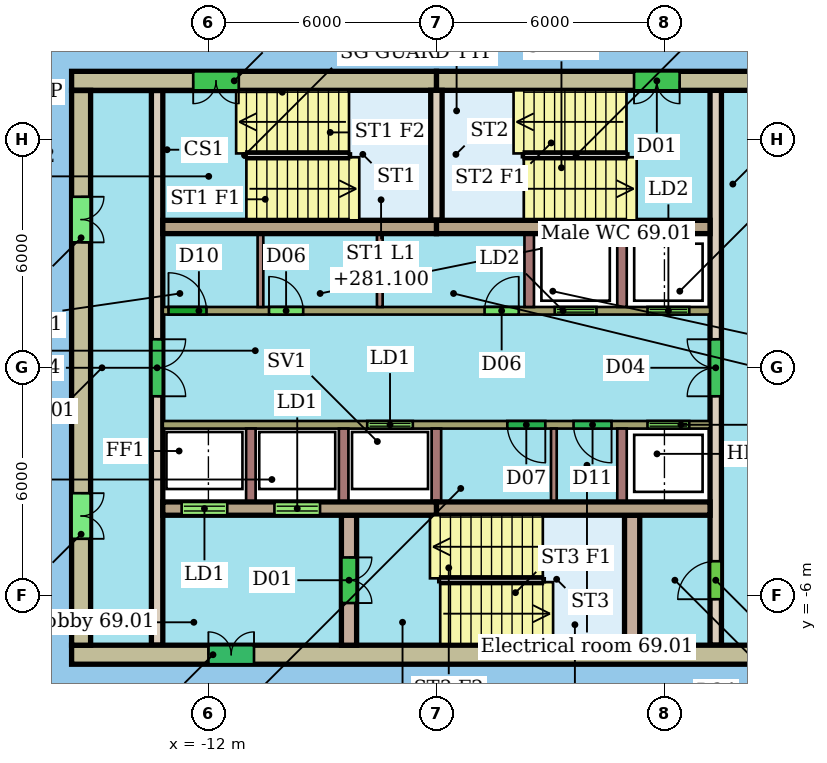
"""IFC4 building model, lengths in metres.
Left out: names, types, materials, properties, quantities, classifications, styles, units other than length and angle.
Written with IfcOpenShell. Run it as: python <this file> out.ifc"""

import sys

from ifc_helpers import new_model, si_unit, direction, frame, frame_2d, origin, place, context, subcontext, project, spatial, rectangle, extrude, element, fill, save


model = new_model("IFC4")
c1 = context("Model", 3, precision=1e-05, world=origin(), true_north=direction((0.0, 1.0)))
c2 = subcontext(c1, "Body", "Model", "MODEL_VIEW")
j1 = project(units=[si_unit("LENGTHUNIT", "METRE"), si_unit("PLANEANGLEUNIT", "RADIAN")], contexts=[c1])
p1 = place(None, origin())
s1 = spatial("IfcSite", under=j1, at=p1, CompositionType="ELEMENT")
p2 = place(p1, origin())
s2 = spatial("IfcBuilding", under=s1, at=p2, CompositionType="ELEMENT")
p3 = place(p2, frame((0.0, 0.0, 279.3)))
s3 = spatial("IfcBuildingStorey", under=s2, at=p3, CompositionType="ELEMENT", Elevation=279.3)
p4 = place(p3, frame((3.6, 7.55, 0.0), z_axis=(0.0, 0.0, 1.0), x_axis=(-1.0, 0.0, 0.0)))
e1 = element("IfcWall", 1, at=p4, inside=s3, PredefinedType="SHEAR", context=c2, shape_type="SweptSolid", body=[
    extrude(rectangle(XDim=9.6, YDim=0.5, at=frame_2d((4.8, 0.0))), origin(), (0.0, 0.0, 1.0), 3.3),
])
p5 = place(p4, frame((3.2, 0.0, 0.0)))
e2 = element("IfcOpeningElement", 2, at=p5, cuts=e1, PredefinedType="OPENING", context=c2, shape_type="SweptSolid", body=[
    extrude(rectangle(XDim=1.2, YDim=2.1, at=frame_2d((0.6, 1.05))), frame((0.0, 0.26, 0.0), z_axis=(0.0, -1.0, 0.0), x_axis=(1.0, 0.0, 0.0)), (0.0, 0.0, 1.0), 0.52),
])
p6 = place(p3, frame((-6.0, 7.55, 0.0), z_axis=(0.0, 0.0, 1.0), x_axis=(-1.0, 0.0, 0.0)))
e3 = element("IfcWall", 3, at=p6, inside=s3, PredefinedType="SHEAR", context=c2, shape_type="SweptSolid", body=[
    extrude(rectangle(XDim=9.6, YDim=0.5, at=frame_2d((4.8, 0.0))), origin(), (0.0, 0.0, 1.0), 3.3),
])
p7 = place(p6, frame((5.2, 0.0, 0.0)))
e4 = element("IfcOpeningElement", 4, at=p7, cuts=e3, PredefinedType="OPENING", context=c2, shape_type="SweptSolid", body=[
    extrude(rectangle(XDim=1.2, YDim=2.1, at=frame_2d((0.6, 1.05))), frame((0.0, 0.26, 0.0), z_axis=(0.0, -1.0, 0.0), x_axis=(1.0, 0.0, 0.0)), (0.0, 0.0, 1.0), 0.52),
])
p8 = place(p3, frame((-15.6, -7.55, 0.0), z_axis=(0.0, 0.0, 1.0), x_axis=(1.0, 0.0, 0.0)))
e5 = element("IfcWall", 5, at=p8, inside=s3, PredefinedType="SHEAR", context=c2, shape_type="SweptSolid", body=[
    extrude(rectangle(XDim=19.2, YDim=0.5, at=frame_2d((9.6, 0.0))), origin(), (0.0, 0.0, 1.0), 3.3),
])
p9 = place(p8, frame((3.6, 0.0, 0.0)))
e6 = element("IfcOpeningElement", 6, at=p9, cuts=e5, PredefinedType="OPENING", context=c2, shape_type="SweptSolid", body=[
    extrude(rectangle(XDim=1.2, YDim=2.1, at=frame_2d((0.6, 1.05))), frame((0.0, 0.26, 0.0), z_axis=(0.0, -1.0, 0.0), x_axis=(1.0, 0.0, 0.0)), (0.0, 0.0, 1.0), 0.52),
])
p10 = place(p3, frame((-15.35, 7.3, 0.0), z_axis=(0.0, 0.0, 1.0), x_axis=(0.0, -1.0, 0.0)))
e7 = element("IfcWall", 7, at=p10, inside=s3, PredefinedType="SHEAR", context=c2, shape_type="SweptSolid", body=[
    extrude(rectangle(XDim=14.6, YDim=0.5, at=frame_2d((7.3, 0.0))), origin(), (0.0, 0.0, 1.0), 3.3),
])
p11 = place(p10, frame((10.6, 0.0, 0.0)))
e8 = element("IfcOpeningElement", 8, at=p11, cuts=e7, PredefinedType="OPENING", context=c2, shape_type="SweptSolid", body=[
    extrude(rectangle(XDim=1.2, YDim=2.1, at=frame_2d((0.6, 1.05))), frame((0.0, 0.26, 0.0), z_axis=(0.0, -1.0, 0.0), x_axis=(1.0, 0.0, 0.0)), (0.0, 0.0, 1.0), 0.52),
])
p12 = place(p10, frame((2.8, 0.0, 0.0)))
e9 = element("IfcOpeningElement", 9, at=p12, cuts=e7, PredefinedType="OPENING", context=c2, shape_type="SweptSolid", body=[
    extrude(rectangle(XDim=1.2, YDim=2.1, at=frame_2d((0.6, 1.05))), frame((0.0, 0.26, 0.0), z_axis=(0.0, -1.0, 0.0), x_axis=(1.0, 0.0, 0.0)), (0.0, 0.0, 1.0), 0.52),
])
for number, where, z_axis, x_axis in (
    (10, (-13.2, 3.705, 0.0), (0.0, 0.0, 1.0), (1.0, 0.0, 0.0)),
    (11, (-6.0, 3.705, 0.0), (0.0, 0.0, 1.0), (1.0, 0.0, 0.0)),
):
    element("IfcWall", number, at=place(p3, frame(where, z_axis=z_axis, x_axis=x_axis)), inside=s3, PredefinedType="SHEAR", context=c2, shape_type="SweptSolid", body=[
        extrude(rectangle(XDim=7.2, YDim=0.35, at=frame_2d((3.6, 0.0))), origin(), (0.0, 0.0, 1.0), 3.3),
    ])
p13 = place(p3, frame((-13.2, -3.705, 0.0), z_axis=(0.0, 0.0, 1.0), x_axis=(1.0, 0.0, 0.0)))
e12 = element("IfcWall", 12, at=p13, inside=s3, PredefinedType="SHEAR", context=c2, shape_type="SweptSolid", body=[
    extrude(rectangle(XDim=7.2, YDim=0.35, at=frame_2d((3.6, 0.0))), origin(), (0.0, 0.0, 1.0), 3.3),
])
p14 = place(p13, frame((0.496, 0.0, 0.0)))
e13 = element("IfcOpeningElement", 13, at=p14, cuts=e12, PredefinedType="OPENING", context=c2, shape_type="SweptSolid", body=[
    extrude(rectangle(XDim=1.2, YDim=2.1, at=frame_2d((0.6, 1.05))), frame((0.0, 0.185, 0.0), z_axis=(0.0, -1.0, 0.0), x_axis=(1.0, 0.0, 0.0)), (0.0, 0.0, 1.0), 0.37),
])
p15 = place(p13, frame((2.938, 0.0, 0.0)))
e14 = element("IfcOpeningElement", 14, at=p15, cuts=e12, PredefinedType="OPENING", context=c2, shape_type="SweptSolid", body=[
    extrude(rectangle(XDim=1.2, YDim=2.1, at=frame_2d((0.6, 1.05))), frame((0.0, 0.185, 0.0), z_axis=(0.0, -1.0, 0.0), x_axis=(1.0, 0.0, 0.0)), (0.0, 0.0, 1.0), 0.37),
])
p16 = place(p3, frame((-6.0, -3.705, 0.0), z_axis=(0.0, 0.0, 1.0), x_axis=(1.0, 0.0, 0.0)))
e15 = element("IfcWall", 15, at=p16, inside=s3, PredefinedType="SHEAR", context=c2, shape_type="SweptSolid", body=[
    extrude(rectangle(XDim=7.2, YDim=0.35, at=frame_2d((3.6, 0.0))), origin(), (0.0, 0.0, 1.0), 3.3),
])
p17 = place(p3, frame((-13.35, 7.3, 0.0), z_axis=(0.0, 0.0, 1.0), x_axis=(0.0, -1.0, 0.0)))
e16 = element("IfcWall", 16, at=p17, inside=s3, PredefinedType="SHEAR", context=c2, shape_type="SweptSolid", body=[
    extrude(rectangle(XDim=14.6, YDim=0.3, at=frame_2d((7.3, 0.0))), origin(), (0.0, 0.0, 1.0), 3.3),
])
p18 = place(p17, frame((6.55, 0.0, 0.0)))
e17 = element("IfcOpeningElement", 17, at=p18, cuts=e16, PredefinedType="OPENING", context=c2, shape_type="SweptSolid", body=[
    extrude(rectangle(XDim=1.5, YDim=2.1, at=frame_2d((0.75, 1.05))), frame((0.0, 0.16, 0.0), z_axis=(0.0, -1.0, 0.0), x_axis=(1.0, 0.0, 0.0)), (0.0, 0.0, 1.0), 0.32),
])
p19 = place(p3, frame((1.35, -7.3, 0.0), z_axis=(0.0, 0.0, 1.0), x_axis=(0.0, 1.0, 0.0)))
e18 = element("IfcWall", 18, at=p19, inside=s3, PredefinedType="SHEAR", context=c2, shape_type="SweptSolid", body=[
    extrude(rectangle(XDim=14.6, YDim=0.3, at=frame_2d((7.3, 0.0))), origin(), (0.0, 0.0, 1.0), 3.3),
])
p20 = place(p19, frame((1.21, 0.0, 0.0)))
e19 = element("IfcOpeningElement", 19, at=p20, cuts=e18, PredefinedType="OPENING", context=c2, shape_type="SweptSolid", body=[
    extrude(rectangle(XDim=1.0, YDim=2.1, at=frame_2d((0.5, 1.05))), frame((0.0, 0.16, 0.0), z_axis=(0.0, -1.0, 0.0), x_axis=(1.0, 0.0, 0.0)), (0.0, 0.0, 1.0), 0.32),
])
p21 = place(p19, frame((6.55, 0.0, 0.0)))
e20 = element("IfcOpeningElement", 20, at=p21, cuts=e18, PredefinedType="OPENING", context=c2, shape_type="SweptSolid", body=[
    extrude(rectangle(XDim=1.5, YDim=2.1, at=frame_2d((0.75, 1.05))), frame((0.0, 0.16, 0.0), z_axis=(0.0, -1.0, 0.0), x_axis=(1.0, 0.0, 0.0)), (0.0, 0.0, 1.0), 0.32),
])
p22 = place(p3, frame((-13.2, 1.5, 0.0), z_axis=(0.0, 0.0, 1.0), x_axis=(1.0, 0.0, 0.0)))
e21 = element("IfcWall", 21, at=p22, inside=s3, PredefinedType="SHEAR", context=c2, shape_type="SweptSolid", body=[
    extrude(rectangle(XDim=14.4, YDim=0.2, at=frame_2d((7.2, 0.0))), origin(), (0.0, 0.0, 1.0), 3.3),
])
p23 = place(p22, frame((10.312, 0.0, 0.0)))
e22 = element("IfcOpeningElement", 22, at=p23, cuts=e21, PredefinedType="OPENING", context=c2, shape_type="SweptSolid", body=[
    extrude(rectangle(XDim=1.1, YDim=2.1, at=frame_2d((0.55, 1.05))), frame((0.0, 0.11, 0.0), z_axis=(0.0, -1.0, 0.0), x_axis=(1.0, 0.0, 0.0)), (0.0, 0.0, 1.0), 0.22),
])
p24 = place(p22, frame((12.754, 0.0, 0.0)))
e23 = element("IfcOpeningElement", 23, at=p24, cuts=e21, PredefinedType="OPENING", context=c2, shape_type="SweptSolid", body=[
    extrude(rectangle(XDim=1.1, YDim=2.1, at=frame_2d((0.55, 1.05))), frame((0.0, 0.11, 0.0), z_axis=(0.0, -1.0, 0.0), x_axis=(1.0, 0.0, 0.0)), (0.0, 0.0, 1.0), 0.22),
])
p25 = place(p22, frame((0.15, 0.0, 0.0)))
e24 = element("IfcOpeningElement", 24, at=p25, cuts=e21, PredefinedType="OPENING", context=c2, shape_type="SweptSolid", body=[
    extrude(rectangle(XDim=1.0, YDim=2.1, at=frame_2d((0.5, 1.05))), frame((0.0, 0.11, 0.0), z_axis=(0.0, -1.0, 0.0), x_axis=(1.0, 0.0, 0.0)), (0.0, 0.0, 1.0), 0.22),
])
p26 = place(p22, frame((2.794, 0.0, 0.0)))
e25 = element("IfcOpeningElement", 25, at=p26, cuts=e21, PredefinedType="OPENING", context=c2, shape_type="SweptSolid", body=[
    extrude(rectangle(XDim=0.9, YDim=2.1, at=frame_2d((0.45, 1.05))), frame((0.0, 0.11, 0.0), z_axis=(0.0, -1.0, 0.0), x_axis=(1.0, 0.0, 0.0)), (0.0, 0.0, 1.0), 0.22),
])
p27 = place(p22, frame((8.467, 0.0, 0.0)))
e26 = element("IfcOpeningElement", 26, at=p27, cuts=e21, PredefinedType="OPENING", context=c2, shape_type="SweptSolid", body=[
    extrude(rectangle(XDim=0.9, YDim=2.1, at=frame_2d((0.45, 1.05))), frame((0.0, 0.11, 0.0), z_axis=(0.0, -1.0, 0.0), x_axis=(1.0, 0.0, 0.0)), (0.0, 0.0, 1.0), 0.22),
])
p28 = place(p3, frame((1.2, -1.5, 0.0), z_axis=(0.0, 0.0, 1.0), x_axis=(-1.0, 0.0, 0.0)))
e27 = element("IfcWall", 27, at=p28, inside=s3, PredefinedType="SHEAR", context=c2, shape_type="SweptSolid", body=[
    extrude(rectangle(XDim=14.4, YDim=0.2, at=frame_2d((7.2, 0.0))), origin(), (0.0, 0.0, 1.0), 3.3),
])
p29 = place(p28, frame((7.821, 0.0, 0.0)))
e28 = element("IfcOpeningElement", 28, at=p29, cuts=e27, PredefinedType="OPENING", context=c2, shape_type="SweptSolid", body=[
    extrude(rectangle(XDim=1.2, YDim=2.1, at=frame_2d((0.6, 1.05))), frame((0.0, 0.11, 0.0), z_axis=(0.0, -1.0, 0.0), x_axis=(1.0, 0.0, 0.0)), (0.0, 0.0, 1.0), 0.22),
])
p30 = place(p28, frame((0.546, 0.0, 0.0)))
e29 = element("IfcOpeningElement", 29, at=p30, cuts=e27, PredefinedType="OPENING", context=c2, shape_type="SweptSolid", body=[
    extrude(rectangle(XDim=1.1, YDim=2.1, at=frame_2d((0.55, 1.05))), frame((0.0, 0.11, 0.0), z_axis=(0.0, -1.0, 0.0), x_axis=(1.0, 0.0, 0.0)), (0.0, 0.0, 1.0), 0.22),
])
p31 = place(p28, frame((4.335, 0.0, 0.0)))
e30 = element("IfcOpeningElement", 30, at=p31, cuts=e27, PredefinedType="OPENING", context=c2, shape_type="SweptSolid", body=[
    extrude(rectangle(XDim=1.0, YDim=2.1, at=frame_2d((0.5, 1.05))), frame((0.0, 0.11, 0.0), z_axis=(0.0, -1.0, 0.0), x_axis=(1.0, 0.0, 0.0)), (0.0, 0.0, 1.0), 0.22),
])
p32 = place(p28, frame((2.592, 0.0, 0.0)))
e31 = element("IfcOpeningElement", 31, at=p32, cuts=e27, PredefinedType="OPENING", context=c2, shape_type="SweptSolid", body=[
    extrude(rectangle(XDim=1.0, YDim=2.1, at=frame_2d((0.5, 1.05))), frame((0.0, 0.11, 0.0), z_axis=(0.0, -1.0, 0.0), x_axis=(1.0, 0.0, 0.0)), (0.0, 0.0, 1.0), 0.22),
])
p33 = place(p3, frame((-8.3, -3.88, 0.0), z_axis=(0.0, 0.0, 1.0), x_axis=(0.0, -1.0, 0.0)))
e32 = element("IfcWall", 32, at=p33, inside=s3, PredefinedType="SHEAR", context=c2, shape_type="SweptSolid", body=[
    extrude(rectangle(XDim=3.42, YDim=0.4, at=frame_2d((1.71, 0.0))), origin(), (0.0, 0.0, 1.0), 3.3),
])
p34 = place(p33, frame((1.11, 0.0, 0.0)))
e33 = element("IfcOpeningElement", 33, at=p34, cuts=e32, PredefinedType="OPENING", context=c2, shape_type="SweptSolid", body=[
    extrude(rectangle(XDim=1.2, YDim=2.1, at=frame_2d((0.6, 1.05))), frame((0.0, 0.21, 0.0), z_axis=(0.0, -1.0, 0.0), x_axis=(1.0, 0.0, 0.0)), (0.0, 0.0, 1.0), 0.42),
])
p35 = place(p3, frame((-0.85, -3.88, 0.0), z_axis=(0.0, 0.0, 1.0), x_axis=(0.0, -1.0, 0.0)))
e34 = element("IfcWall", 34, at=p35, inside=s3, PredefinedType="SHEAR", context=c2, shape_type="SweptSolid", body=[
    extrude(rectangle(XDim=3.42, YDim=0.4, at=frame_2d((1.71, 0.0))), origin(), (0.0, 0.0, 1.0), 3.3),
])
p36 = place(p3, frame((-6.0, 3.88, 0.0), z_axis=(0.0, 0.0, 1.0), x_axis=(0.0, 1.0, 0.0)))
e35 = element("IfcWall", 35, at=p36, inside=s3, PredefinedType="SHEAR", context=c2, shape_type="SweptSolid", body=[
    extrude(rectangle(XDim=3.42, YDim=0.3, at=frame_2d((1.71, 0.0))), origin(), (0.0, 0.0, 1.0), 3.3),
])
for number, where, z_axis, x_axis in (
    (36, (-3.558, 1.6, 0.0), (0.0, 0.0, 1.0), (0.0, 1.0, 0.0)),
    (37, (-1.117, 1.6, 0.0), (0.0, 0.0, 1.0), (0.0, 1.0, 0.0)),
):
    element("IfcWall", number, at=place(p3, frame(where, z_axis=z_axis, x_axis=x_axis)), inside=s3, PredefinedType="SHEAR", context=c2, shape_type="SweptSolid", body=[
        extrude(rectangle(XDim=1.93, YDim=0.25, at=frame_2d((0.965, 0.0))), origin(), (0.0, 0.0, 1.0), 3.3),
    ])
for number, where, z_axis, x_axis in (
    (38, (-10.631, 1.6, 0.0), (0.0, 0.0, 1.0), (0.0, 1.0, 0.0)),
    (39, (-7.49, 1.6, 0.0), (0.0, 0.0, 1.0), (0.0, 1.0, 0.0)),
):
    element("IfcWall", number, at=place(p3, frame(where, z_axis=z_axis, x_axis=x_axis)), inside=s3, PredefinedType="PARTITIONING", context=c2, shape_type="SweptSolid", body=[
        extrude(rectangle(XDim=1.93, YDim=0.15, at=frame_2d((0.965, 0.0))), origin(), (0.0, 0.0, 1.0), 3.3),
    ])
for number, where, z_axis, x_axis in (
    (40, (-10.883, -1.6, 0.0), (0.0, 0.0, 1.0), (0.0, -1.0, 0.0)),
    (41, (-8.442, -1.6, 0.0), (0.0, 0.0, 1.0), (0.0, -1.0, 0.0)),
    (42, (-6.0, -1.6, 0.0), (0.0, 0.0, 1.0), (0.0, -1.0, 0.0)),
    (43, (-1.117, -1.6, 0.0), (0.0, 0.0, 1.0), (0.0, -1.0, 0.0)),
):
    element("IfcWall", number, at=place(p3, frame(where, z_axis=z_axis, x_axis=x_axis)), inside=s3, PredefinedType="SHEAR", context=c2, shape_type="SweptSolid", body=[
        extrude(rectangle(XDim=1.93, YDim=0.25, at=frame_2d((0.965, 0.0))), origin(), (0.0, 0.0, 1.0), 3.3),
    ])
p37 = place(p3, frame((-2.91, -1.6, 0.0), z_axis=(0.0, 0.0, 1.0), x_axis=(0.0, -1.0, 0.0)))
e44 = element("IfcWall", 44, at=p37, inside=s3, PredefinedType="PARTITIONING", context=c2, shape_type="SweptSolid", body=[
    extrude(rectangle(XDim=1.93, YDim=0.15, at=frame_2d((0.965, 0.0))), origin(), (0.0, 0.0, 1.0), 3.3),
])
p38 = place(p5, origin())
e45 = element("IfcDoor", 45, at=p38, inside=s3, OperationType="DOUBLE_DOOR_SINGLE_SWING", PredefinedType="NOTDEFINED", context=c2, shape_type="SweptSolid", body=[
    extrude(rectangle(XDim=1.2, YDim=2.1, at=frame_2d((0.6, 1.05))), frame((0.0, 0.025, 0.0), z_axis=(0.0, -1.0, 0.0), x_axis=(1.0, 0.0, 0.0)), (0.0, 0.0, 1.0), 0.05),
])
fill(e2, e45)
p39 = place(p7, origin())
e46 = element("IfcDoor", 46, at=p39, inside=s3, OperationType="DOUBLE_DOOR_SINGLE_SWING", PredefinedType="NOTDEFINED", context=c2, shape_type="SweptSolid", body=[
    extrude(rectangle(XDim=1.2, YDim=2.1, at=frame_2d((0.6, 1.05))), frame((0.0, 0.025, 0.0), z_axis=(0.0, -1.0, 0.0), x_axis=(1.0, 0.0, 0.0)), (0.0, 0.0, 1.0), 0.05),
])
fill(e4, e46)
p40 = place(p9, origin())
e47 = element("IfcDoor", 47, at=p40, inside=s3, OperationType="DOUBLE_DOOR_SINGLE_SWING", PredefinedType="NOTDEFINED", context=c2, shape_type="SweptSolid", body=[
    extrude(rectangle(XDim=1.2, YDim=2.1, at=frame_2d((0.6, 1.05))), frame((0.0, 0.025, 0.0), z_axis=(0.0, -1.0, 0.0), x_axis=(1.0, 0.0, 0.0)), (0.0, 0.0, 1.0), 0.05),
])
fill(e6, e47)
p41 = place(p11, origin())
e48 = element("IfcDoor", 48, at=p41, inside=s3, OperationType="DOUBLE_DOOR_SINGLE_SWING", PredefinedType="NOTDEFINED", context=c2, shape_type="SweptSolid", body=[
    extrude(rectangle(XDim=1.2, YDim=2.1, at=frame_2d((0.6, 1.05))), frame((0.0, 0.025, 0.0), z_axis=(0.0, -1.0, 0.0), x_axis=(1.0, 0.0, 0.0)), (0.0, 0.0, 1.0), 0.05),
])
fill(e8, e48)
p42 = place(p12, origin())
e49 = element("IfcDoor", 49, at=p42, inside=s3, OperationType="DOUBLE_DOOR_SINGLE_SWING", PredefinedType="NOTDEFINED", context=c2, shape_type="SweptSolid", body=[
    extrude(rectangle(XDim=1.2, YDim=2.1, at=frame_2d((0.6, 1.05))), frame((0.0, 0.025, 0.0), z_axis=(0.0, -1.0, 0.0), x_axis=(1.0, 0.0, 0.0)), (0.0, 0.0, 1.0), 0.05),
])
fill(e9, e49)
p43 = place(p14, origin())
e50 = element("IfcDoor", 50, at=p43, inside=s3, OperationType="DOUBLE_DOOR_SLIDING", PredefinedType="NOTDEFINED", context=c2, shape_type="SweptSolid", body=[
    extrude(rectangle(XDim=1.2, YDim=2.1, at=frame_2d((0.6, 1.05))), frame((0.0, 0.025, 0.0), z_axis=(0.0, -1.0, 0.0), x_axis=(1.0, 0.0, 0.0)), (0.0, 0.0, 1.0), 0.05),
])
fill(e13, e50)
p44 = place(p15, origin())
e51 = element("IfcDoor", 51, at=p44, inside=s3, OperationType="DOUBLE_DOOR_SLIDING", PredefinedType="NOTDEFINED", context=c2, shape_type="SweptSolid", body=[
    extrude(rectangle(XDim=1.2, YDim=2.1, at=frame_2d((0.6, 1.05))), frame((0.0, 0.025, 0.0), z_axis=(0.0, -1.0, 0.0), x_axis=(1.0, 0.0, 0.0)), (0.0, 0.0, 1.0), 0.05),
])
fill(e14, e51)
p45 = place(p18, origin())
e52 = element("IfcDoor", 52, at=p45, inside=s3, OperationType="DOUBLE_DOOR_SINGLE_SWING", PredefinedType="NOTDEFINED", context=c2, shape_type="SweptSolid", body=[
    extrude(rectangle(XDim=1.5, YDim=2.1, at=frame_2d((0.75, 1.05))), frame((0.0, 0.025, 0.0), z_axis=(0.0, -1.0, 0.0), x_axis=(1.0, 0.0, 0.0)), (0.0, 0.0, 1.0), 0.05),
])
fill(e17, e52)
p46 = place(p20, origin())
e53 = element("IfcDoor", 53, at=p46, inside=s3, OperationType="SINGLE_SWING_LEFT", PredefinedType="NOTDEFINED", context=c2, shape_type="SweptSolid", body=[
    extrude(rectangle(XDim=1.0, YDim=2.1, at=frame_2d((0.5, 1.05))), frame((0.0, 0.025, 0.0), z_axis=(0.0, -1.0, 0.0), x_axis=(1.0, 0.0, 0.0)), (0.0, 0.0, 1.0), 0.05),
])
fill(e19, e53)
p47 = place(p21, origin())
e54 = element("IfcDoor", 54, at=p47, inside=s3, OperationType="DOUBLE_DOOR_SINGLE_SWING", PredefinedType="NOTDEFINED", context=c2, shape_type="SweptSolid", body=[
    extrude(rectangle(XDim=1.5, YDim=2.1, at=frame_2d((0.75, 1.05))), frame((0.0, 0.025, 0.0), z_axis=(0.0, -1.0, 0.0), x_axis=(1.0, 0.0, 0.0)), (0.0, 0.0, 1.0), 0.05),
])
fill(e20, e54)
p48 = place(p23, origin())
e55 = element("IfcDoor", 55, at=p48, inside=s3, OperationType="DOUBLE_DOOR_SLIDING", PredefinedType="NOTDEFINED", context=c2, shape_type="SweptSolid", body=[
    extrude(rectangle(XDim=1.1, YDim=2.1, at=frame_2d((0.55, 1.05))), frame((0.0, 0.025, 0.0), z_axis=(0.0, -1.0, 0.0), x_axis=(1.0, 0.0, 0.0)), (0.0, 0.0, 1.0), 0.05),
])
fill(e22, e55)
p49 = place(p24, origin())
e56 = element("IfcDoor", 56, at=p49, inside=s3, OperationType="DOUBLE_DOOR_SLIDING", PredefinedType="NOTDEFINED", context=c2, shape_type="SweptSolid", body=[
    extrude(rectangle(XDim=1.1, YDim=2.1, at=frame_2d((0.55, 1.05))), frame((0.0, 0.025, 0.0), z_axis=(0.0, -1.0, 0.0), x_axis=(1.0, 0.0, 0.0)), (0.0, 0.0, 1.0), 0.05),
])
fill(e23, e56)
p50 = place(p25, origin())
e57 = element("IfcDoor", 57, at=p50, inside=s3, OperationType="SINGLE_SWING_LEFT", PredefinedType="NOTDEFINED", context=c2, shape_type="SweptSolid", body=[
    extrude(rectangle(XDim=1.0, YDim=2.1, at=frame_2d((0.5, 1.05))), frame((0.0, 0.025, 0.0), z_axis=(0.0, -1.0, 0.0), x_axis=(1.0, 0.0, 0.0)), (0.0, 0.0, 1.0), 0.05),
])
fill(e24, e57)
p51 = place(p26, origin())
e58 = element("IfcDoor", 58, at=p51, inside=s3, OperationType="SINGLE_SWING_LEFT", PredefinedType="NOTDEFINED", context=c2, shape_type="SweptSolid", body=[
    extrude(rectangle(XDim=0.9, YDim=2.1, at=frame_2d((0.45, 1.05))), frame((0.0, 0.025, 0.0), z_axis=(0.0, -1.0, 0.0), x_axis=(1.0, 0.0, 0.0)), (0.0, 0.0, 1.0), 0.05),
])
fill(e25, e58)
p52 = place(p27, origin())
e59 = element("IfcDoor", 59, at=p52, inside=s3, OperationType="SINGLE_SWING_RIGHT", PredefinedType="NOTDEFINED", context=c2, shape_type="SweptSolid", body=[
    extrude(rectangle(XDim=0.9, YDim=2.1, at=frame_2d((0.45, 1.05))), frame((0.0, 0.025, 0.0), z_axis=(0.0, -1.0, 0.0), x_axis=(1.0, 0.0, 0.0)), (0.0, 0.0, 1.0), 0.05),
])
fill(e26, e59)
p53 = place(p29, origin())
e60 = element("IfcDoor", 60, at=p53, inside=s3, OperationType="DOUBLE_DOOR_SLIDING", PredefinedType="NOTDEFINED", context=c2, shape_type="SweptSolid", body=[
    extrude(rectangle(XDim=1.2, YDim=2.1, at=frame_2d((0.6, 1.05))), frame((0.0, 0.025, 0.0), z_axis=(0.0, -1.0, 0.0), x_axis=(1.0, 0.0, 0.0)), (0.0, 0.0, 1.0), 0.05),
])
fill(e28, e60)
p54 = place(p30, origin())
e61 = element("IfcDoor", 61, at=p54, inside=s3, OperationType="DOUBLE_DOOR_SLIDING", PredefinedType="NOTDEFINED", context=c2, shape_type="SweptSolid", body=[
    extrude(rectangle(XDim=1.1, YDim=2.1, at=frame_2d((0.55, 1.05))), frame((0.0, 0.025, 0.0), z_axis=(0.0, -1.0, 0.0), x_axis=(1.0, 0.0, 0.0)), (0.0, 0.0, 1.0), 0.05),
])
fill(e29, e61)
p55 = place(p31, origin())
e62 = element("IfcDoor", 62, at=p55, inside=s3, OperationType="SINGLE_SWING_LEFT", PredefinedType="NOTDEFINED", context=c2, shape_type="SweptSolid", body=[
    extrude(rectangle(XDim=1.0, YDim=2.1, at=frame_2d((0.5, 1.05))), frame((0.0, 0.025, 0.0), z_axis=(0.0, -1.0, 0.0), x_axis=(1.0, 0.0, 0.0)), (0.0, 0.0, 1.0), 0.05),
])
fill(e30, e62)
p56 = place(p32, origin())
e63 = element("IfcDoor", 63, at=p56, inside=s3, OperationType="SINGLE_SWING_LEFT", PredefinedType="NOTDEFINED", context=c2, shape_type="SweptSolid", body=[
    extrude(rectangle(XDim=1.0, YDim=2.1, at=frame_2d((0.5, 1.05))), frame((0.0, 0.025, 0.0), z_axis=(0.0, -1.0, 0.0), x_axis=(1.0, 0.0, 0.0)), (0.0, 0.0, 1.0), 0.05),
])
fill(e31, e63)
p57 = place(p34, origin())
e64 = element("IfcDoor", 64, at=p57, inside=s3, OperationType="DOUBLE_DOOR_SINGLE_SWING", PredefinedType="NOTDEFINED", context=c2, shape_type="SweptSolid", body=[
    extrude(rectangle(XDim=1.2, YDim=2.1, at=frame_2d((0.6, 1.05))), frame((0.0, 0.025, 0.0), z_axis=(0.0, -1.0, 0.0), x_axis=(1.0, 0.0, 0.0)), (0.0, 0.0, 1.0), 0.05),
])
fill(e33, e64)
save(model, sys.argv[1])
